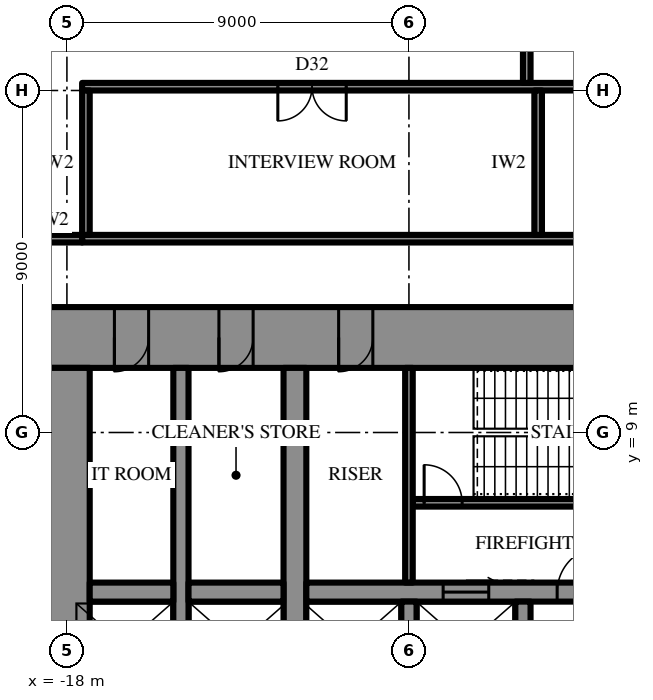
"""IFC4 building model, lengths in metres.
Left out: names, types, materials, properties, quantities, classifications, styles, units other than length and angle.
Written with IfcOpenShell. Run it as: python <this file> out.ifc"""

import sys

from ifc_helpers import new_model, si_unit, direction, frame, frame_2d, origin, place, context, subcontext, project, spatial, rectangle, extrude, element, fill, save


model = new_model("IFC4")
c1 = context("Model", 3, precision=1e-05, world=origin(), true_north=direction((0.0, 1.0)))
c2 = subcontext(c1, "Body", "Model", "MODEL_VIEW")
j1 = project(units=[si_unit("LENGTHUNIT", "METRE"), si_unit("PLANEANGLEUNIT", "RADIAN")], contexts=[c1])
p1 = place(None, origin())
s1 = spatial("IfcSite", under=j1, at=p1, CompositionType="ELEMENT")
p2 = place(p1, origin())
s2 = spatial("IfcBuilding", under=s1, at=p2, CompositionType="ELEMENT")
p3 = place(p2, frame((0.0, 0.0, 82.3)))
s3 = spatial("IfcBuildingStorey", under=s2, at=p3, CompositionType="ELEMENT", Elevation=82.3)
p4 = place(p3, frame((-18.6, 11.5, 0.0), z_axis=(0.0, 0.0, 1.0), x_axis=(1.0, 0.0, 0.0)))
e1 = element("IfcWall", 1, at=p4, inside=s3, PredefinedType="SHEAR", context=c2, shape_type="SweptSolid", body=[
    extrude(rectangle(XDim=37.2, YDim=1.6, at=frame_2d((18.6, 0.0))), origin(), (0.0, 0.0, 1.0), 4.2),
])
p5 = place(p4, frame((19.45, 0.0, 0.0)))
e2 = element("IfcOpeningElement", 2, at=p5, cuts=e1, PredefinedType="OPENING", context=c2, shape_type="SweptSolid", body=[
    extrude(rectangle(XDim=0.9, YDim=2.2, at=frame_2d((0.45, 1.1))), frame((0.0, 0.81, 0.0), z_axis=(0.0, -1.0, 0.0), x_axis=(1.0, 0.0, 0.0)), (0.0, 0.0, 1.0), 1.62),
])
p6 = place(p4, frame((22.45, 0.0, 0.0)))
e3 = element("IfcOpeningElement", 3, at=p6, cuts=e1, PredefinedType="OPENING", context=c2, shape_type="SweptSolid", body=[
    extrude(rectangle(XDim=0.9, YDim=2.2, at=frame_2d((0.45, 1.1))), frame((0.0, 0.81, 0.0), z_axis=(0.0, -1.0, 0.0), x_axis=(1.0, 0.0, 0.0)), (0.0, 0.0, 1.0), 1.62),
])
p7 = place(p4, frame((25.5, 0.0, 0.0)))
e4 = element("IfcOpeningElement", 4, at=p7, cuts=e1, PredefinedType="OPENING", context=c2, shape_type="SweptSolid", body=[
    extrude(rectangle(XDim=1.0, YDim=2.2, at=frame_2d((0.5, 1.1))), frame((0.0, 0.81, 0.0), z_axis=(0.0, -1.0, 0.0), x_axis=(1.0, 0.0, 0.0)), (0.0, 0.0, 1.0), 1.62),
])
p8 = place(p4, frame((1.85, 0.0, 0.0)))
e5 = element("IfcOpeningElement", 5, at=p8, cuts=e1, PredefinedType="OPENING", context=c2, shape_type="SweptSolid", body=[
    extrude(rectangle(XDim=0.9, YDim=2.2, at=frame_2d((0.45, 1.1))), frame((0.0, 0.81, 0.0), z_axis=(0.0, -1.0, 0.0), x_axis=(1.0, 0.0, 0.0)), (0.0, 0.0, 1.0), 1.62),
])
p9 = place(p4, frame((4.6, 0.0, 0.0)))
e6 = element("IfcOpeningElement", 6, at=p9, cuts=e1, PredefinedType="OPENING", context=c2, shape_type="SweptSolid", body=[
    extrude(rectangle(XDim=0.9, YDim=2.2, at=frame_2d((0.45, 1.1))), frame((0.0, 0.81, 0.0), z_axis=(0.0, -1.0, 0.0), x_axis=(1.0, 0.0, 0.0)), (0.0, 0.0, 1.0), 1.62),
])
p10 = place(p4, frame((7.75, 0.0, 0.0)))
e7 = element("IfcOpeningElement", 7, at=p10, cuts=e1, PredefinedType="OPENING", context=c2, shape_type="SweptSolid", body=[
    extrude(rectangle(XDim=0.9, YDim=2.2, at=frame_2d((0.45, 1.1))), frame((0.0, 0.81, 0.0), z_axis=(0.0, -1.0, 0.0), x_axis=(1.0, 0.0, 0.0)), (0.0, 0.0, 1.0), 1.62),
])
p11 = place(p4, frame((28.55, 0.0, 0.0)))
e8 = element("IfcOpeningElement", 8, at=p11, cuts=e1, PredefinedType="OPENING", context=c2, shape_type="SweptSolid", body=[
    extrude(rectangle(XDim=0.9, YDim=2.2, at=frame_2d((0.45, 1.1))), frame((0.0, 0.81, 0.0), z_axis=(0.0, -1.0, 0.0), x_axis=(1.0, 0.0, 0.0)), (0.0, 0.0, 1.0), 1.62),
])
p12 = place(p4, frame((31.7, 0.0, 0.0)))
e9 = element("IfcOpeningElement", 9, at=p12, cuts=e1, PredefinedType="OPENING", context=c2, shape_type="SweptSolid", body=[
    extrude(rectangle(XDim=0.9, YDim=2.2, at=frame_2d((0.45, 1.1))), frame((0.0, 0.81, 0.0), z_axis=(0.0, -1.0, 0.0), x_axis=(1.0, 0.0, 0.0)), (0.0, 0.0, 1.0), 1.62),
])
p13 = place(p4, frame((34.45, 0.0, 0.0)))
e10 = element("IfcOpeningElement", 10, at=p13, cuts=e1, PredefinedType="OPENING", context=c2, shape_type="SweptSolid", body=[
    extrude(rectangle(XDim=0.9, YDim=2.2, at=frame_2d((0.45, 1.1))), frame((0.0, 0.81, 0.0), z_axis=(0.0, -1.0, 0.0), x_axis=(1.0, 0.0, 0.0)), (0.0, 0.0, 1.0), 1.62),
])
p14 = place(p3, frame((-18.0, 10.7, 0.0), z_axis=(0.0, 0.0, 1.0), x_axis=(0.0, -1.0, 0.0)))
e11 = element("IfcWall", 11, at=p14, inside=s3, PredefinedType="SHEAR", context=c2, shape_type="SweptSolid", body=[
    extrude(rectangle(XDim=21.4, YDim=1.2, at=frame_2d((10.7, 0.0))), origin(), (0.0, 0.0, 1.0), 4.2),
])
p15 = place(p14, frame((9.8, 0.0, 0.0)))
e12 = element("IfcOpeningElement", 12, at=p15, cuts=e11, PredefinedType="OPENING", context=c2, shape_type="SweptSolid", body=[
    extrude(rectangle(XDim=1.8, YDim=2.4, at=frame_2d((0.9, 1.2))), frame((0.0, 0.61, 0.0), z_axis=(0.0, -1.0, 0.0), x_axis=(1.0, 0.0, 0.0)), (0.0, 0.0, 1.0), 1.22),
])
p16 = place(p3, frame((-12.0, -10.7, 0.0), z_axis=(0.0, 0.0, 1.0), x_axis=(0.0, 1.0, 0.0)))
e13 = element("IfcWall", 13, at=p16, inside=s3, PredefinedType="SHEAR", context=c2, shape_type="SweptSolid", body=[
    extrude(rectangle(XDim=21.4, YDim=0.6, at=frame_2d((10.7, 0.0))), origin(), (0.0, 0.0, 1.0), 4.2),
])
p17 = place(p16, frame((9.8, 0.0, 0.0)))
e14 = element("IfcOpeningElement", 14, at=p17, cuts=e13, PredefinedType="OPENING", context=c2, shape_type="SweptSolid", body=[
    extrude(rectangle(XDim=1.8, YDim=2.4, at=frame_2d((0.9, 1.2))), frame((0.0, 0.31, 0.0), z_axis=(0.0, -1.0, 0.0), x_axis=(1.0, 0.0, 0.0)), (0.0, 0.0, 1.0), 0.62),
])
p18 = place(p3, frame((-15.0, -10.7, 0.0), z_axis=(0.0, 0.0, 1.0), x_axis=(0.0, 1.0, 0.0)))
e15 = element("IfcWall", 15, at=p18, inside=s3, PredefinedType="SHEAR", context=c2, shape_type="SweptSolid", body=[
    extrude(rectangle(XDim=21.4, YDim=0.4, at=frame_2d((10.7, 0.0))), origin(), (0.0, 0.0, 1.0), 4.2),
])
p19 = place(p18, frame((9.8, 0.0, 0.0)))
e16 = element("IfcOpeningElement", 16, at=p19, cuts=e15, PredefinedType="OPENING", context=c2, shape_type="SweptSolid", body=[
    extrude(rectangle(XDim=1.8, YDim=2.4, at=frame_2d((0.9, 1.2))), frame((0.0, 0.21, 0.0), z_axis=(0.0, -1.0, 0.0), x_axis=(1.0, 0.0, 0.0)), (0.0, 0.0, 1.0), 0.42),
])
p20 = place(p3, frame((-17.4, 4.8, 0.0), z_axis=(0.0, 0.0, 1.0), x_axis=(1.0, 0.0, 0.0)))
e17 = element("IfcWall", 17, at=p20, inside=s3, PredefinedType="SHEAR", context=c2, shape_type="SweptSolid", body=[
    extrude(rectangle(XDim=2.2, YDim=0.5, at=frame_2d((1.1, 0.0))), origin(), (0.0, 0.0, 1.0), 4.2),
])
p21 = place(p3, frame((-14.8, 4.8, 0.0), z_axis=(0.0, 0.0, 1.0), x_axis=(1.0, 0.0, 0.0)))
e18 = element("IfcWall", 18, at=p21, inside=s3, PredefinedType="SHEAR", context=c2, shape_type="SweptSolid", body=[
    extrude(rectangle(XDim=2.5, YDim=0.5, at=frame_2d((1.25, 0.0))), origin(), (0.0, 0.0, 1.0), 4.2),
])
p22 = place(p3, frame((-11.7, 4.8, 0.0), z_axis=(0.0, 0.0, 1.0), x_axis=(1.0, 0.0, 0.0)))
e19 = element("IfcWall", 19, at=p22, inside=s3, PredefinedType="SHEAR", context=c2, shape_type="SweptSolid", body=[
    extrude(rectangle(XDim=23.4, YDim=0.5, at=frame_2d((11.7, 0.0))), origin(), (0.0, 0.0, 1.0), 4.2),
])
p23 = place(p22, frame((6.6, 0.0, 0.0)))
e20 = element("IfcOpeningElement", 20, at=p23, cuts=e19, PredefinedType="OPENING", context=c2, shape_type="SweptSolid", body=[
    extrude(rectangle(XDim=1.2, YDim=2.2, at=frame_2d((0.6, 1.1))), frame((0.0, 0.26, 0.0), z_axis=(0.0, -1.0, 0.0), x_axis=(1.0, 0.0, 0.0)), (0.0, 0.0, 1.0), 0.52),
])
p24 = place(p22, frame((3.6, 0.0, 0.0)))
e21 = element("IfcOpeningElement", 21, at=p24, cuts=e19, PredefinedType="OPENING", context=c2, shape_type="SweptSolid", body=[
    extrude(rectangle(XDim=1.2, YDim=2.2, at=frame_2d((0.6, 1.1))), frame((0.0, 0.26, 0.0), z_axis=(0.0, -1.0, 0.0), x_axis=(1.0, 0.0, 0.0)), (0.0, 0.0, 1.0), 0.52),
])
for number, where, z_axis, x_axis in (
    (22, (-9.0, 2.25, 0.0), (0.0, 0.0, 1.0), (0.0, 1.0, 0.0)),
    (23, (-6.0, 2.25, 0.0), (0.0, 0.0, 1.0), (0.0, 1.0, 0.0)),
):
    element("IfcWall", number, at=place(p3, frame(where, z_axis=z_axis, x_axis=x_axis)), inside=s3, PredefinedType="SHEAR", context=c2, shape_type="SweptSolid", body=[
        extrude(rectangle(XDim=2.3, YDim=0.4, at=frame_2d((1.15, 0.0))), origin(), (0.0, 0.0, 1.0), 4.2),
    ])
p25 = place(p3, frame((-8.9, 7.15, 0.0), z_axis=(0.0, 0.0, 1.0), x_axis=(1.0, 0.0, 0.0)))
e24 = element("IfcWall", 24, at=p25, inside=s3, PredefinedType="SHEAR", context=c2, shape_type="SweptSolid", body=[
    extrude(rectangle(XDim=8.6, YDim=0.2, at=frame_2d((4.3, 0.0))), origin(), (0.0, 0.0, 1.0), 4.2),
])
p26 = place(p25, frame((0.3, 0.0, 0.0)))
e25 = element("IfcOpeningElement", 25, at=p26, cuts=e24, PredefinedType="OPENING", context=c2, shape_type="SweptSolid", body=[
    extrude(rectangle(XDim=1.0, YDim=2.2, at=frame_2d((0.5, 1.1))), frame((0.0, 0.11, 0.0), z_axis=(0.0, -1.0, 0.0), x_axis=(1.0, 0.0, 0.0)), (0.0, 0.0, 1.0), 0.22),
])
p27 = place(p3, frame((-9.0, 5.05, 0.0), z_axis=(0.0, 0.0, 1.0), x_axis=(0.0, 1.0, 0.0)))
e26 = element("IfcWall", 26, at=p27, inside=s3, PredefinedType="PARTITIONING", context=c2, shape_type="SweptSolid", body=[
    extrude(rectangle(XDim=5.65, YDim=0.2, at=frame_2d((2.825, 0.0))), origin(), (0.0, 0.0, 1.0), 4.0),
])
p28 = place(p3, frame((-17.6, 14.1, 0.0), z_axis=(0.0, 0.0, 1.0), x_axis=(1.0, 0.0, 0.0)))
e27 = element("IfcWall", 27, at=p28, inside=s3, PredefinedType="PARTITIONING", context=c2, shape_type="SweptSolid", body=[
    extrude(rectangle(XDim=35.2, YDim=0.2, at=frame_2d((17.6, 0.0))), origin(), (0.0, 0.0, 1.0), 4.0),
])
p29 = place(p3, frame((-17.6, 18.1, 0.0), z_axis=(0.0, 0.0, 1.0), x_axis=(1.0, 0.0, 0.0)))
e28 = element("IfcWall", 28, at=p29, inside=s3, PredefinedType="PARTITIONING", context=c2, shape_type="SweptSolid", body=[
    extrude(rectangle(XDim=35.2, YDim=0.2, at=frame_2d((17.6, 0.0))), origin(), (0.0, 0.0, 1.0), 4.0),
])
p30 = place(p29, frame((5.15, 0.0, 0.0)))
e29 = element("IfcOpeningElement", 29, at=p30, cuts=e28, PredefinedType="OPENING", context=c2, shape_type="SweptSolid", body=[
    extrude(rectangle(XDim=1.8, YDim=2.4, at=frame_2d((0.9, 1.2))), frame((0.0, 0.11, 0.0), z_axis=(0.0, -1.0, 0.0), x_axis=(1.0, 0.0, 0.0)), (0.0, 0.0, 1.0), 0.22),
])
p31 = place(p29, frame((16.875, 0.0, 0.0)))
e30 = element("IfcOpeningElement", 30, at=p31, cuts=e28, PredefinedType="OPENING", context=c2, shape_type="SweptSolid", body=[
    extrude(rectangle(XDim=1.8, YDim=2.4, at=frame_2d((0.9, 1.2))), frame((0.0, 0.11, 0.0), z_axis=(0.0, -1.0, 0.0), x_axis=(1.0, 0.0, 0.0)), (0.0, 0.0, 1.0), 0.22),
])
p32 = place(p29, frame((28.425, 0.0, 0.0)))
e31 = element("IfcOpeningElement", 31, at=p32, cuts=e28, PredefinedType="OPENING", context=c2, shape_type="SweptSolid", body=[
    extrude(rectangle(XDim=1.8, YDim=2.4, at=frame_2d((0.9, 1.2))), frame((0.0, 0.11, 0.0), z_axis=(0.0, -1.0, 0.0), x_axis=(1.0, 0.0, 0.0)), (0.0, 0.0, 1.0), 0.22),
])
for number, where, z_axis, x_axis in (
    (32, (-17.5, 14.2, 0.0), (0.0, 0.0, 1.0), (0.0, 1.0, 0.0)),
    (33, (-5.6, 14.2, 0.0), (0.0, 0.0, 1.0), (0.0, 1.0, 0.0)),
):
    element("IfcWall", number, at=place(p3, frame(where, z_axis=z_axis, x_axis=x_axis)), inside=s3, PredefinedType="PARTITIONING", context=c2, shape_type="SweptSolid", body=[
        extrude(rectangle(XDim=3.8, YDim=0.2, at=frame_2d((1.9, 0.0))), origin(), (0.0, 0.0, 1.0), 4.0),
    ])
p33 = place(p3, frame((-19.2, 14.1, 0.0), z_axis=(0.0, 0.0, 1.0), x_axis=(1.0, 0.0, 0.0)))
e34 = element("IfcWall", 34, at=p33, inside=s3, PredefinedType="PARTITIONING", context=c2, shape_type="SweptSolid", body=[
    extrude(rectangle(XDim=1.6, YDim=0.2, at=frame_2d((0.8, 0.0))), origin(), (0.0, 0.0, 1.0), 4.0),
])
p34 = place(p3, frame((-5.9, 18.2, 0.0), z_axis=(0.0, 0.0, 1.0), x_axis=(0.0, 1.0, 0.0)))
e35 = element("IfcWall", 35, at=p34, inside=s3, PredefinedType="PARTITIONING", context=c2, shape_type="SweptSolid", body=[
    extrude(rectangle(XDim=14.1, YDim=0.2, at=frame_2d((7.05, 0.0))), origin(), (0.0, 0.0, 1.0), 4.0),
])
p35 = place(p34, frame((0.91, 0.0, 0.0)))
e36 = element("IfcOpeningElement", 36, at=p35, cuts=e35, PredefinedType="OPENING", context=c2, shape_type="SweptSolid", body=[
    extrude(rectangle(XDim=1.0, YDim=2.2, at=frame_2d((0.5, 1.1))), frame((0.0, 0.11, 0.0), z_axis=(0.0, -1.0, 0.0), x_axis=(1.0, 0.0, 0.0)), (0.0, 0.0, 1.0), 0.22),
])
p36 = place(p23, origin())
e37 = element("IfcDoor", 37, at=p36, inside=s3, OperationType="SINGLE_SWING_LEFT", PredefinedType="DOOR", context=c2, shape_type="SweptSolid", body=[
    extrude(rectangle(XDim=1.2, YDim=2.2, at=frame_2d((0.6, 1.1))), frame((0.0, 0.025, 0.0), z_axis=(0.0, -1.0, 0.0), x_axis=(1.0, 0.0, 0.0)), (0.0, 0.0, 1.0), 0.05),
])
fill(e20, e37)
p37 = place(p26, origin())
e38 = element("IfcDoor", 38, at=p37, inside=s3, OperationType="SINGLE_SWING_RIGHT", PredefinedType="DOOR", context=c2, shape_type="SweptSolid", body=[
    extrude(rectangle(XDim=1.0, YDim=2.2, at=frame_2d((0.5, 1.1))), frame((0.0, 0.025, 0.0), z_axis=(0.0, -1.0, 0.0), x_axis=(1.0, 0.0, 0.0)), (0.0, 0.0, 1.0), 0.05),
])
fill(e25, e38)
p38 = place(p8, frame((0.9, 0.0, 0.0), z_axis=(0.0, 0.0, 1.0), x_axis=(-1.0, 0.0, 0.0)))
e39 = element("IfcDoor", 39, at=p38, inside=s3, OperationType="SINGLE_SWING_LEFT", PredefinedType="DOOR", context=c2, shape_type="SweptSolid", body=[
    extrude(rectangle(XDim=0.9, YDim=2.2, at=frame_2d((0.45, 1.1))), frame((0.0, 0.025, 0.0), z_axis=(0.0, -1.0, 0.0), x_axis=(1.0, 0.0, 0.0)), (0.0, 0.0, 1.0), 0.05),
])
fill(e5, e39)
p39 = place(p9, frame((0.9, 0.0, 0.0), z_axis=(0.0, 0.0, 1.0), x_axis=(-1.0, 0.0, 0.0)))
e40 = element("IfcDoor", 40, at=p39, inside=s3, OperationType="SINGLE_SWING_LEFT", PredefinedType="DOOR", context=c2, shape_type="SweptSolid", body=[
    extrude(rectangle(XDim=0.9, YDim=2.2, at=frame_2d((0.45, 1.1))), frame((0.0, 0.025, 0.0), z_axis=(0.0, -1.0, 0.0), x_axis=(1.0, 0.0, 0.0)), (0.0, 0.0, 1.0), 0.05),
])
fill(e6, e40)
p40 = place(p10, frame((0.9, 0.0, 0.0), z_axis=(0.0, 0.0, 1.0), x_axis=(-1.0, 0.0, 0.0)))
e41 = element("IfcDoor", 41, at=p40, inside=s3, OperationType="SINGLE_SWING_LEFT", PredefinedType="DOOR", context=c2, shape_type="SweptSolid", body=[
    extrude(rectangle(XDim=0.9, YDim=2.2, at=frame_2d((0.45, 1.1))), frame((0.0, 0.025, 0.0), z_axis=(0.0, -1.0, 0.0), x_axis=(1.0, 0.0, 0.0)), (0.0, 0.0, 1.0), 0.05),
])
fill(e7, e41)
p41 = place(p24, origin())
e42 = element("IfcDoor", 42, at=p41, inside=s3, OperationType="SLIDING_TO_LEFT", PredefinedType="DOOR", context=c2, shape_type="SweptSolid", body=[
    extrude(rectangle(XDim=1.2, YDim=2.2, at=frame_2d((0.6, 1.1))), frame((0.0, 0.025, 0.0), z_axis=(0.0, -1.0, 0.0), x_axis=(1.0, 0.0, 0.0)), (0.0, 0.0, 1.0), 0.05),
])
fill(e21, e42)
p42 = place(p30, frame((1.8, 0.0, 0.0), z_axis=(0.0, 0.0, 1.0), x_axis=(-1.0, 0.0, 0.0)))
e43 = element("IfcDoor", 43, at=p42, inside=s3, OperationType="DOUBLE_DOOR_SINGLE_SWING", PredefinedType="DOOR", context=c2, shape_type="SweptSolid", body=[
    extrude(rectangle(XDim=1.8, YDim=2.4, at=frame_2d((0.9, 1.2))), frame((0.0, 0.025, 0.0), z_axis=(0.0, -1.0, 0.0), x_axis=(1.0, 0.0, 0.0)), (0.0, 0.0, 1.0), 0.05),
])
fill(e29, e43)
save(model, sys.argv[1])
